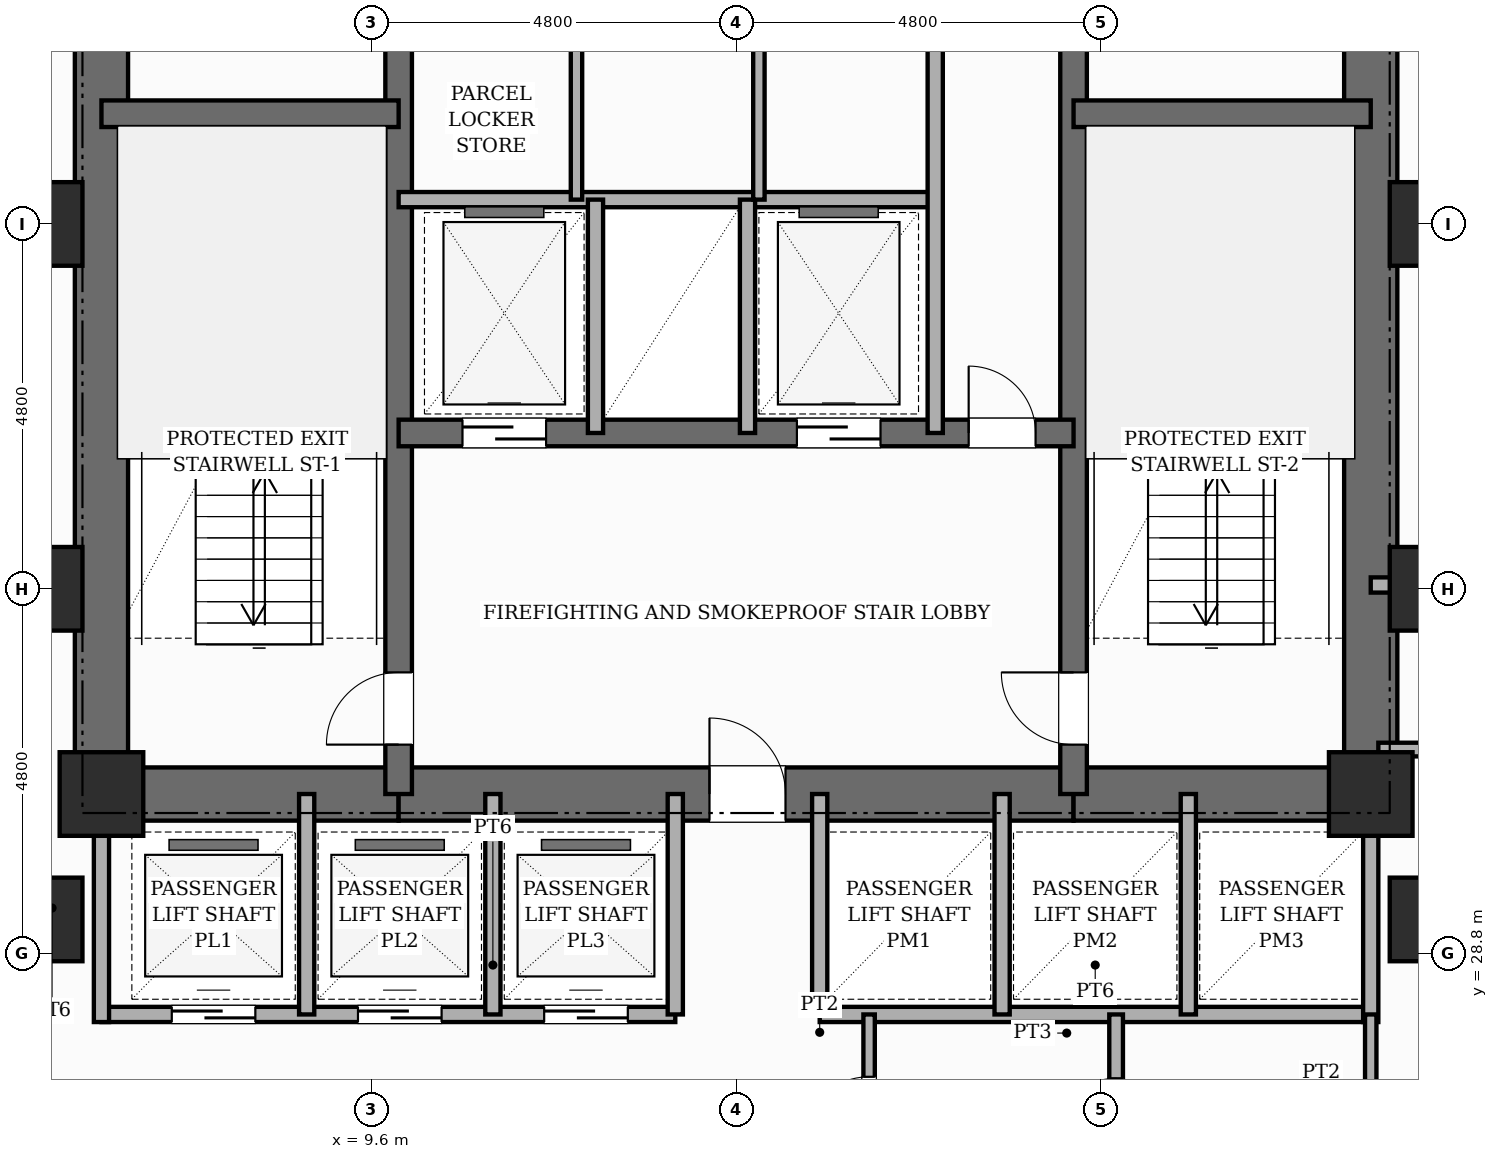
"""IFC4 building model, lengths in metres.
Left out: names, types, materials, properties, quantities, classifications, styles, units other than length and angle.
Written with IfcOpenShell. Run it as: python <this file> out.ifc"""

import sys

from ifc_helpers import new_model, si_unit, direction, frame, frame_2d, origin, origin_2d, place, context, subcontext, project, spatial, rectangle, extrude, element, fill, save


model = new_model("IFC4")
c1 = context("Model", 3, precision=1e-05, world=origin(), true_north=direction((0.0, 1.0)))
c2 = subcontext(c1, "Body", "Model", "MODEL_VIEW")
j1 = project(units=[si_unit("LENGTHUNIT", "METRE"), si_unit("PLANEANGLEUNIT", "RADIAN")], contexts=[c1])
p1 = place(None, origin())
s1 = spatial("IfcSite", under=j1, at=p1, CompositionType="ELEMENT")
p2 = place(p1, origin())
s2 = spatial("IfcBuilding", under=s1, at=p2, CompositionType="ELEMENT")
p3 = place(p2, frame((0.0, 0.0, 79.0)))
s3 = spatial("IfcBuildingStorey", under=s2, at=p3, CompositionType="ELEMENT", Elevation=79.0)
p4 = place(p3, frame((6.05, 30.55, 0.0), z_axis=(0.0, 0.0, 1.0), x_axis=(0.0, 1.0, 0.0)))
e1 = element("IfcWall", 1, at=p4, inside=s3, PredefinedType="SHEAR", context=c2, shape_type="SweptSolid", body=[
    extrude(rectangle(XDim=15.6, YDim=0.7, at=frame_2d((7.8, 0.0))), origin(), (0.0, 0.0, 1.0), 3.6),
])
p5 = place(p3, frame((22.75, 30.55, 0.0), z_axis=(0.0, 0.0, 1.0), x_axis=(0.0, 1.0, 0.0)))
e2 = element("IfcWall", 2, at=p5, inside=s3, PredefinedType="SHEAR", context=c2, shape_type="SweptSolid", body=[
    extrude(rectangle(XDim=15.6, YDim=0.7, at=frame_2d((7.8, 0.0))), origin(), (0.0, 0.0, 1.0), 3.6),
])
p6 = place(p5, frame((10.8, 0.0, 0.0)))
e3 = element("IfcOpeningElement", 3, at=p6, cuts=e2, PredefinedType="OPENING", context=c2, shape_type="SweptSolid", body=[
    extrude(rectangle(XDim=1.0, YDim=2.15, at=frame_2d((0.5, 1.075))), frame((0.0, 0.36, 0.0), z_axis=(0.0, -1.0, 0.0), x_axis=(1.0, 0.0, 0.0)), (0.0, 0.0, 1.0), 0.72),
])
p7 = place(p3, frame((6.05, 30.9, 0.0), z_axis=(0.0, 0.0, 1.0), x_axis=(1.0, 0.0, 0.0)))
e4 = element("IfcWall", 4, at=p7, inside=s3, PredefinedType="SHEAR", context=c2, shape_type="SweptSolid", body=[
    extrude(rectangle(XDim=3.91, YDim=0.7, at=frame_2d((1.955, 0.0))), origin(), (0.0, 0.0, 1.0), 3.6),
])
p8 = place(p3, frame((9.96, 30.9, 0.0), z_axis=(0.0, 0.0, 1.0), x_axis=(1.0, 0.0, 0.0)))
e5 = element("IfcWall", 5, at=p8, inside=s3, PredefinedType="SHEAR", context=c2, shape_type="SweptSolid", body=[
    extrude(rectangle(XDim=8.88, YDim=0.7, at=frame_2d((4.44, 0.0))), origin(), (0.0, 0.0, 1.0), 3.6),
])
p9 = place(p8, frame((4.09, 0.0, 0.0)))
e6 = element("IfcOpeningElement", 6, at=p9, cuts=e5, PredefinedType="OPENING", context=c2, shape_type="SweptSolid", body=[
    extrude(rectangle(XDim=1.0, YDim=2.15, at=frame_2d((0.5, 1.075))), frame((0.0, 0.36, 0.0), z_axis=(0.0, -1.0, 0.0), x_axis=(1.0, 0.0, 0.0)), (0.0, 0.0, 1.0), 0.72),
])
p10 = place(p3, frame((18.84, 30.9, 0.0), z_axis=(0.0, 0.0, 1.0), x_axis=(1.0, 0.0, 0.0)))
e7 = element("IfcWall", 7, at=p10, inside=s3, PredefinedType="SHEAR", context=c2, shape_type="SweptSolid", body=[
    extrude(rectangle(XDim=3.91, YDim=0.7, at=frame_2d((1.955, 0.0))), origin(), (0.0, 0.0, 1.0), 3.6),
])
p11 = place(p3, frame((9.96, 30.9, 0.0), z_axis=(0.0, 0.0, 1.0), x_axis=(0.0, 1.0, 0.0)))
e8 = element("IfcWall", 8, at=p11, inside=s3, PredefinedType="SHEAR", context=c2, shape_type="SweptSolid", body=[
    extrude(rectangle(XDim=14.9, YDim=0.35, at=frame_2d((7.45, 0.0))), origin(), (0.0, 0.0, 1.0), 3.6),
])
p12 = place(p11, frame((0.65, 0.0, 0.0)))
e9 = element("IfcOpeningElement", 9, at=p12, cuts=e8, PredefinedType="OPENING", context=c2, shape_type="SweptSolid", body=[
    extrude(rectangle(XDim=0.95, YDim=2.1, at=frame_2d((0.475, 1.05))), frame((0.0, 0.185, 0.0), z_axis=(0.0, -1.0, 0.0), x_axis=(1.0, 0.0, 0.0)), (0.0, 0.0, 1.0), 0.37),
])
p13 = place(p11, frame((10.45, 0.0, 0.0)))
e10 = element("IfcOpeningElement", 10, at=p13, cuts=e8, PredefinedType="OPENING", context=c2, shape_type="SweptSolid", body=[
    extrude(rectangle(XDim=1.0, YDim=2.15, at=frame_2d((0.5, 1.075))), frame((0.0, 0.185, 0.0), z_axis=(0.0, -1.0, 0.0), x_axis=(1.0, 0.0, 0.0)), (0.0, 0.0, 1.0), 0.37),
])
p14 = place(p3, frame((18.84, 30.9, 0.0), z_axis=(0.0, 0.0, 1.0), x_axis=(0.0, 1.0, 0.0)))
e11 = element("IfcWall", 11, at=p14, inside=s3, PredefinedType="SHEAR", context=c2, shape_type="SweptSolid", body=[
    extrude(rectangle(XDim=14.9, YDim=0.35, at=frame_2d((7.45, 0.0))), origin(), (0.0, 0.0, 1.0), 3.6),
])
p15 = place(p14, frame((0.65, 0.0, 0.0)))
e12 = element("IfcOpeningElement", 12, at=p15, cuts=e11, PredefinedType="OPENING", context=c2, shape_type="SweptSolid", body=[
    extrude(rectangle(XDim=0.95, YDim=2.1, at=frame_2d((0.475, 1.05))), frame((0.0, 0.185, 0.0), z_axis=(0.0, -1.0, 0.0), x_axis=(1.0, 0.0, 0.0)), (0.0, 0.0, 1.0), 0.37),
])
p16 = place(p14, frame((10.45, 0.0, 0.0)))
e13 = element("IfcOpeningElement", 13, at=p16, cuts=e11, PredefinedType="OPENING", context=c2, shape_type="SweptSolid", body=[
    extrude(rectangle(XDim=1.0, YDim=2.15, at=frame_2d((0.5, 1.075))), frame((0.0, 0.185, 0.0), z_axis=(0.0, -1.0, 0.0), x_axis=(1.0, 0.0, 0.0)), (0.0, 0.0, 1.0), 0.37),
])
for number, where, z_axis, x_axis in (
    (14, (6.05, 39.85, 0.0), (0.0, 0.0, 1.0), (1.0, 0.0, 0.0)),
    (15, (18.84, 39.85, 0.0), (0.0, 0.0, 1.0), (1.0, 0.0, 0.0)),
):
    element("IfcWall", number, at=place(p3, frame(where, z_axis=z_axis, x_axis=x_axis)), inside=s3, PredefinedType="SHEAR", context=c2, shape_type="SweptSolid", body=[
        extrude(rectangle(XDim=3.91, YDim=0.35, at=frame_2d((1.955, 0.0))), origin(), (0.0, 0.0, 1.0), 3.6),
    ])
p17 = place(p3, frame((9.96, 35.65, 0.0), z_axis=(0.0, 0.0, 1.0), x_axis=(1.0, 0.0, 0.0)))
e16 = element("IfcWall", 16, at=p17, inside=s3, PredefinedType="SHEAR", context=c2, shape_type="SweptSolid", body=[
    extrude(rectangle(XDim=8.88, YDim=0.35, at=frame_2d((4.44, 0.0))), origin(), (0.0, 0.0, 1.0), 3.6),
])
p18 = place(p17, frame((0.84, 0.0, 0.0)))
e17 = element("IfcOpeningElement", 17, at=p18, cuts=e16, PredefinedType="OPENING", context=c2, shape_type="SweptSolid", body=[
    extrude(rectangle(XDim=1.1, YDim=2.15, at=frame_2d((0.55, 1.075))), frame((0.0, 0.185, 0.0), z_axis=(0.0, -1.0, 0.0), x_axis=(1.0, 0.0, 0.0)), (0.0, 0.0, 1.0), 0.37),
])
p19 = place(p17, frame((5.24, 0.0, 0.0)))
e18 = element("IfcOpeningElement", 18, at=p19, cuts=e16, PredefinedType="OPENING", context=c2, shape_type="SweptSolid", body=[
    extrude(rectangle(XDim=1.1, YDim=2.15, at=frame_2d((0.55, 1.075))), frame((0.0, 0.185, 0.0), z_axis=(0.0, -1.0, 0.0), x_axis=(1.0, 0.0, 0.0)), (0.0, 0.0, 1.0), 0.37),
])
p20 = place(p17, frame((7.5, 0.0, 0.0)))
e19 = element("IfcOpeningElement", 19, at=p20, cuts=e16, PredefinedType="OPENING", context=c2, shape_type="SweptSolid", body=[
    extrude(rectangle(XDim=0.88, YDim=2.1, at=frame_2d((0.44, 1.05))), frame((0.0, 0.185, 0.0), z_axis=(0.0, -1.0, 0.0), x_axis=(1.0, 0.0, 0.0)), (0.0, 0.0, 1.0), 0.37),
])
for number, where, z_axis, x_axis in (
    (20, (5.25, 29.25, 0.0), (0.0, 0.0, 1.0), (1.0, 0.0, 0.0)),
    (21, (5.25, 33.6, 0.0), (0.0, 0.0, 1.0), (1.0, 0.0, 0.0)),
    (22, (5.25, 38.4, 0.0), (0.0, 0.0, 1.0), (1.0, 0.0, 0.0)),
    (23, (6.05, 30.9, 0.0), (0.0, 0.0, 1.0), (1.0, 0.0, 0.0)),
    (24, (22.75, 30.9, 0.0), (0.0, 0.0, 1.0), (1.0, 0.0, 0.0)),
    (25, (23.55, 29.25, 0.0), (0.0, 0.0, 1.0), (1.0, 0.0, 0.0)),
    (26, (23.55, 33.6, 0.0), (0.0, 0.0, 1.0), (1.0, 0.0, 0.0)),
    (27, (23.55, 38.4, 0.0), (0.0, 0.0, 1.0), (1.0, 0.0, 0.0)),
):
    element("IfcColumn", number, at=place(p3, frame(where, z_axis=z_axis, x_axis=x_axis)), inside=s3, PredefinedType="COLUMN", context=c2, shape_type="SweptSolid", body=[
        extrude(rectangle(XDim=1.1, YDim=1.1, at=origin_2d()), origin(), (0.0, 0.0, 1.0), 3.6),
    ])
p21 = place(p3, frame((9.96, 38.72, 0.0), z_axis=(0.0, 0.0, 1.0), x_axis=(1.0, 0.0, 0.0)))
e28 = element("IfcWall", 28, at=p21, inside=s3, PredefinedType="POLYGONAL", context=c2, shape_type="SweptSolid", body=[
    extrude(rectangle(XDim=7.06, YDim=0.2, at=frame_2d((3.53, 0.0))), origin(), (0.0, 0.0, 1.0), 3.35),
])
for number, where, z_axis, x_axis in (
    (29, (12.55, 35.65, 0.0), (0.0, 0.0, 1.0), (0.0, 1.0, 0.0)),
    (30, (14.55, 35.65, 0.0), (0.0, 0.0, 1.0), (0.0, 1.0, 0.0)),
):
    element("IfcWall", number, at=place(p3, frame(where, z_axis=z_axis, x_axis=x_axis)), inside=s3, PredefinedType="POLYGONAL", context=c2, shape_type="SweptSolid", body=[
        extrude(rectangle(XDim=3.07, YDim=0.2, at=frame_2d((1.535, 0.0))), origin(), (0.0, 0.0, 1.0), 3.35),
    ])
p22 = place(p3, frame((17.02, 35.65, 0.0), z_axis=(0.0, 0.0, 1.0), x_axis=(0.0, 1.0, 0.0)))
e31 = element("IfcWall", 31, at=p22, inside=s3, PredefinedType="POLYGONAL", context=c2, shape_type="SweptSolid", body=[
    extrude(rectangle(XDim=5.15, YDim=0.2, at=frame_2d((2.575, 0.0))), origin(), (0.0, 0.0, 1.0), 3.35),
])
for number, where, z_axis, x_axis in (
    (32, (12.3, 38.72, 0.0), (0.0, 0.0, 1.0), (0.0, 1.0, 0.0)),
    (33, (14.7, 38.72, 0.0), (0.0, 0.0, 1.0), (0.0, 1.0, 0.0)),
):
    element("IfcWall", number, at=place(p3, frame(where, z_axis=z_axis, x_axis=x_axis)), inside=s3, PredefinedType="PARTITIONING", context=c2, shape_type="SweptSolid", body=[
        extrude(rectangle(XDim=2.08, YDim=0.15, at=frame_2d((1.04, 0.0))), origin(), (0.0, 0.0, 1.0), 3.35),
    ])
p23 = place(p3, frame((6.05, 28.0, 0.0), z_axis=(0.0, 0.0, 1.0), x_axis=(1.0, 0.0, 0.0)))
e34 = element("IfcWall", 34, at=p23, inside=s3, PredefinedType="POLYGONAL", context=c2, shape_type="SweptSolid", body=[
    extrude(rectangle(XDim=7.55, YDim=0.2, at=frame_2d((3.775, 0.0))), origin(), (0.0, 0.0, 1.0), 3.35),
])
p24 = place(p23, frame((0.925, 0.0, 0.0)))
e35 = element("IfcOpeningElement", 35, at=p24, cuts=e34, PredefinedType="OPENING", context=c2, shape_type="SweptSolid", body=[
    extrude(rectangle(XDim=1.1, YDim=2.15, at=frame_2d((0.55, 1.075))), frame((0.0, 0.11, 0.0), z_axis=(0.0, -1.0, 0.0), x_axis=(1.0, 0.0, 0.0)), (0.0, 0.0, 1.0), 0.22),
])
p25 = place(p23, frame((3.375, 0.0, 0.0)))
e36 = element("IfcOpeningElement", 36, at=p25, cuts=e34, PredefinedType="OPENING", context=c2, shape_type="SweptSolid", body=[
    extrude(rectangle(XDim=1.1, YDim=2.15, at=frame_2d((0.55, 1.075))), frame((0.0, 0.11, 0.0), z_axis=(0.0, -1.0, 0.0), x_axis=(1.0, 0.0, 0.0)), (0.0, 0.0, 1.0), 0.22),
])
p26 = place(p23, frame((5.825, 0.0, 0.0)))
e37 = element("IfcOpeningElement", 37, at=p26, cuts=e34, PredefinedType="OPENING", context=c2, shape_type="SweptSolid", body=[
    extrude(rectangle(XDim=1.1, YDim=2.15, at=frame_2d((0.55, 1.075))), frame((0.0, 0.11, 0.0), z_axis=(0.0, -1.0, 0.0), x_axis=(1.0, 0.0, 0.0)), (0.0, 0.0, 1.0), 0.22),
])
p27 = place(p3, frame((15.5, 28.0, 0.0), z_axis=(0.0, 0.0, 1.0), x_axis=(1.0, 0.0, 0.0)))
e38 = element("IfcWall", 38, at=p27, inside=s3, PredefinedType="POLYGONAL", context=c2, shape_type="SweptSolid", body=[
    extrude(rectangle(XDim=7.25, YDim=0.2, at=frame_2d((3.625, 0.0))), origin(), (0.0, 0.0, 1.0), 3.35),
])
for number, where, z_axis, x_axis in (
    (39, (6.05, 27.9, 0.0), (0.0, 0.0, 1.0), (0.0, 1.0, 0.0)),
    (40, (22.75, 27.9, 0.0), (0.0, 0.0, 1.0), (0.0, 1.0, 0.0)),
):
    element("IfcWall", number, at=place(p3, frame(where, z_axis=z_axis, x_axis=x_axis)), inside=s3, PredefinedType="POLYGONAL", context=c2, shape_type="SweptSolid", body=[
        extrude(rectangle(XDim=3.0, YDim=0.2, at=frame_2d((1.5, 0.0))), origin(), (0.0, 0.0, 1.0), 3.35),
    ])
for number, where, z_axis, x_axis in (
    (41, (13.6, 28.0, 0.0), (0.0, 0.0, 1.0), (0.0, 1.0, 0.0)),
    (42, (15.5, 28.0, 0.0), (0.0, 0.0, 1.0), (0.0, 1.0, 0.0)),
    (43, (8.75, 28.0, 0.0), (0.0, 0.0, 1.0), (0.0, 1.0, 0.0)),
    (44, (11.2, 28.0, 0.0), (0.0, 0.0, 1.0), (0.0, 1.0, 0.0)),
    (45, (17.9, 28.0, 0.0), (0.0, 0.0, 1.0), (0.0, 1.0, 0.0)),
    (46, (20.35, 28.0, 0.0), (0.0, 0.0, 1.0), (0.0, 1.0, 0.0)),
):
    element("IfcWall", number, at=place(p3, frame(where, z_axis=z_axis, x_axis=x_axis)), inside=s3, PredefinedType="POLYGONAL", context=c2, shape_type="SweptSolid", body=[
        extrude(rectangle(XDim=2.9, YDim=0.2, at=frame_2d((1.45, 0.0))), origin(), (0.0, 0.0, 1.0), 3.35),
    ])
p28 = place(p3, frame((16.15, 25.75, 0.0), z_axis=(0.0, 0.0, 1.0), x_axis=(0.0, 1.0, 0.0)))
e47 = element("IfcWall", 47, at=p28, inside=s3, PredefinedType="PARTITIONING", context=c2, shape_type="SweptSolid", body=[
    extrude(rectangle(XDim=2.25, YDim=0.15, at=frame_2d((1.125, 0.0))), origin(), (0.0, 0.0, 1.0), 3.35),
])
p29 = place(p28, frame((0.55, 0.0, 0.0)))
e48 = element("IfcOpeningElement", 48, at=p29, cuts=e47, PredefinedType="OPENING", context=c2, shape_type="SweptSolid", body=[
    extrude(rectangle(XDim=0.88, YDim=2.1, at=frame_2d((0.44, 1.05))), frame((0.0, 0.085, 0.0), z_axis=(0.0, -1.0, 0.0), x_axis=(1.0, 0.0, 0.0)), (0.0, 0.0, 1.0), 0.17),
])
p30 = place(p3, frame((22.75, 25.75, 0.0), z_axis=(0.0, 0.0, 1.0), x_axis=(0.0, 1.0, 0.0)))
e49 = element("IfcWall", 49, at=p30, inside=s3, PredefinedType="PARTITIONING", context=c2, shape_type="SweptSolid", body=[
    extrude(rectangle(XDim=2.25, YDim=0.15, at=frame_2d((1.125, 0.0))), origin(), (0.0, 0.0, 1.0), 3.35),
])
p31 = place(p3, frame((19.4, 25.75, 0.0), z_axis=(0.0, 0.0, 1.0), x_axis=(0.0, 1.0, 0.0)))
e50 = element("IfcWall", 50, at=p31, inside=s3, PredefinedType="PLUMBINGWALL", context=c2, shape_type="SweptSolid", body=[
    extrude(rectangle(XDim=2.25, YDim=0.18, at=frame_2d((1.125, 0.0))), origin(), (0.0, 0.0, 1.0), 3.35),
])
p32 = place(p31, frame((0.55, 0.0, 0.0)))
e51 = element("IfcOpeningElement", 51, at=p32, cuts=e50, PredefinedType="OPENING", context=c2, shape_type="SweptSolid", body=[
    extrude(rectangle(XDim=0.86, YDim=2.1, at=frame_2d((0.43, 1.05))), frame((0.0, 0.1, 0.0), z_axis=(0.0, -1.0, 0.0), x_axis=(1.0, 0.0, 0.0)), (0.0, 0.0, 1.0), 0.2),
])
p33 = place(p3, frame((22.75, 33.65, 0.0), z_axis=(0.0, 0.0, 1.0), x_axis=(1.0, 0.0, 0.0)))
e52 = element("IfcWall", 52, at=p33, inside=s3, PredefinedType="PARTITIONING", context=c2, shape_type="SweptSolid", body=[
    extrude(rectangle(XDim=34.53, YDim=0.2, at=frame_2d((17.265, 0.0))), origin(), (0.0, 0.0, 1.0), 2.53),
])
p34 = place(p33, frame((5.495, 0.0, 0.0)))
e53 = element("IfcOpeningElement", 53, at=p34, cuts=e52, PredefinedType="OPENING", context=c2, shape_type="SweptSolid", body=[
    extrude(rectangle(XDim=0.98, YDim=2.18, at=frame_2d((0.49, 1.09))), frame((0.0, 0.11, 0.0), z_axis=(0.0, -1.0, 0.0), x_axis=(1.0, 0.0, 0.0)), (0.0, 0.0, 1.0), 0.22),
])
p35 = place(p33, frame((9.961, 0.0, 0.0)))
e54 = element("IfcOpeningElement", 54, at=p35, cuts=e52, PredefinedType="OPENING", context=c2, shape_type="SweptSolid", body=[
    extrude(rectangle(XDim=0.98, YDim=2.18, at=frame_2d((0.49, 1.09))), frame((0.0, 0.11, 0.0), z_axis=(0.0, -1.0, 0.0), x_axis=(1.0, 0.0, 0.0)), (0.0, 0.0, 1.0), 0.22),
])
p36 = place(p33, frame((19.066, 0.0, 0.0)))
e55 = element("IfcOpeningElement", 55, at=p36, cuts=e52, PredefinedType="OPENING", context=c2, shape_type="SweptSolid", body=[
    extrude(rectangle(XDim=0.98, YDim=2.18, at=frame_2d((0.49, 1.09))), frame((0.0, 0.11, 0.0), z_axis=(0.0, -1.0, 0.0), x_axis=(1.0, 0.0, 0.0)), (0.0, 0.0, 1.0), 0.22),
])
p37 = place(p33, frame((27.815, 0.0, 0.0)))
e56 = element("IfcOpeningElement", 56, at=p37, cuts=e52, PredefinedType="OPENING", context=c2, shape_type="SweptSolid", body=[
    extrude(rectangle(XDim=0.98, YDim=2.18, at=frame_2d((0.49, 1.09))), frame((0.0, 0.11, 0.0), z_axis=(0.0, -1.0, 0.0), x_axis=(1.0, 0.0, 0.0)), (0.0, 0.0, 1.0), 0.22),
])
p38 = place(p3, frame((22.85, 31.485, 0.0), z_axis=(0.0, 0.0, 1.0), x_axis=(1.0, 0.0, 0.0)))
e57 = element("IfcWall", 57, at=p38, inside=s3, PredefinedType="PLUMBINGWALL", context=c2, shape_type="SweptSolid", body=[
    extrude(rectangle(XDim=3.9, YDim=0.18, at=frame_2d((1.95, 0.0))), origin(), (0.0, 0.0, 1.0), 3.35),
])
p39 = place(p12, origin())
e58 = element("IfcDoor", 58, at=p39, inside=s3, OperationType="SINGLE_SWING_LEFT", PredefinedType="DOOR", context=c2, shape_type="SweptSolid", body=[
    extrude(rectangle(XDim=0.95, YDim=2.1, at=frame_2d((0.475, 1.05))), frame((0.0, 0.025, 0.0), z_axis=(0.0, -1.0, 0.0), x_axis=(1.0, 0.0, 0.0)), (0.0, 0.0, 1.0), 0.05),
])
fill(e9, e58)
p40 = place(p15, origin())
e59 = element("IfcDoor", 59, at=p40, inside=s3, OperationType="SINGLE_SWING_RIGHT", PredefinedType="DOOR", context=c2, shape_type="SweptSolid", body=[
    extrude(rectangle(XDim=0.95, YDim=2.1, at=frame_2d((0.475, 1.05))), frame((0.0, 0.025, 0.0), z_axis=(0.0, -1.0, 0.0), x_axis=(1.0, 0.0, 0.0)), (0.0, 0.0, 1.0), 0.05),
])
fill(e12, e59)
p41 = place(p9, origin())
e60 = element("IfcDoor", 60, at=p41, inside=s3, OperationType="SINGLE_SWING_LEFT", PredefinedType="DOOR", context=c2, shape_type="SweptSolid", body=[
    extrude(rectangle(XDim=1.0, YDim=2.15, at=frame_2d((0.5, 1.075))), frame((0.0, 0.025, 0.0), z_axis=(0.0, -1.0, 0.0), x_axis=(1.0, 0.0, 0.0)), (0.0, 0.0, 1.0), 0.05),
])
fill(e6, e60)
p42 = place(p18, origin())
e61 = element("IfcDoor", 61, at=p42, inside=s3, OperationType="SLIDING_TO_LEFT", PredefinedType="DOOR", context=c2, shape_type="SweptSolid", body=[
    extrude(rectangle(XDim=1.1, YDim=2.15, at=frame_2d((0.55, 1.075))), frame((0.0, 0.025, 0.0), z_axis=(0.0, -1.0, 0.0), x_axis=(1.0, 0.0, 0.0)), (0.0, 0.0, 1.0), 0.05),
])
fill(e17, e61)
p43 = place(p19, origin())
e62 = element("IfcDoor", 62, at=p43, inside=s3, OperationType="SLIDING_TO_RIGHT", PredefinedType="DOOR", context=c2, shape_type="SweptSolid", body=[
    extrude(rectangle(XDim=1.1, YDim=2.15, at=frame_2d((0.55, 1.075))), frame((0.0, 0.025, 0.0), z_axis=(0.0, -1.0, 0.0), x_axis=(1.0, 0.0, 0.0)), (0.0, 0.0, 1.0), 0.05),
])
fill(e18, e62)
p44 = place(p20, origin())
e63 = element("IfcDoor", 63, at=p44, inside=s3, OperationType="SINGLE_SWING_LEFT", PredefinedType="DOOR", context=c2, shape_type="SweptSolid", body=[
    extrude(rectangle(XDim=0.88, YDim=2.1, at=frame_2d((0.44, 1.05))), frame((0.0, 0.025, 0.0), z_axis=(0.0, -1.0, 0.0), x_axis=(1.0, 0.0, 0.0)), (0.0, 0.0, 1.0), 0.05),
])
fill(e19, e63)
p45 = place(p24, origin())
e64 = element("IfcDoor", 64, at=p45, inside=s3, OperationType="SLIDING_TO_LEFT", PredefinedType="DOOR", context=c2, shape_type="SweptSolid", body=[
    extrude(rectangle(XDim=1.1, YDim=2.15, at=frame_2d((0.55, 1.075))), frame((0.0, 0.025, 0.0), z_axis=(0.0, -1.0, 0.0), x_axis=(1.0, 0.0, 0.0)), (0.0, 0.0, 1.0), 0.05),
])
fill(e35, e64)
p46 = place(p25, origin())
e65 = element("IfcDoor", 65, at=p46, inside=s3, OperationType="SLIDING_TO_RIGHT", PredefinedType="DOOR", context=c2, shape_type="SweptSolid", body=[
    extrude(rectangle(XDim=1.1, YDim=2.15, at=frame_2d((0.55, 1.075))), frame((0.0, 0.025, 0.0), z_axis=(0.0, -1.0, 0.0), x_axis=(1.0, 0.0, 0.0)), (0.0, 0.0, 1.0), 0.05),
])
fill(e36, e65)
p47 = place(p26, origin())
e66 = element("IfcDoor", 66, at=p47, inside=s3, OperationType="SLIDING_TO_LEFT", PredefinedType="DOOR", context=c2, shape_type="SweptSolid", body=[
    extrude(rectangle(XDim=1.1, YDim=2.15, at=frame_2d((0.55, 1.075))), frame((0.0, 0.025, 0.0), z_axis=(0.0, -1.0, 0.0), x_axis=(1.0, 0.0, 0.0)), (0.0, 0.0, 1.0), 0.05),
])
fill(e37, e66)
p48 = place(p29, origin())
e67 = element("IfcDoor", 67, at=p48, inside=s3, OperationType="SINGLE_SWING_LEFT", PredefinedType="DOOR", context=c2, shape_type="SweptSolid", body=[
    extrude(rectangle(XDim=0.88, YDim=2.1, at=frame_2d((0.44, 1.05))), frame((0.0, 0.025, 0.0), z_axis=(0.0, -1.0, 0.0), x_axis=(1.0, 0.0, 0.0)), (0.0, 0.0, 1.0), 0.05),
])
fill(e48, e67)
p49 = place(p32, origin())
e68 = element("IfcDoor", 68, at=p49, inside=s3, OperationType="SINGLE_SWING_LEFT", PredefinedType="DOOR", context=c2, shape_type="SweptSolid", body=[
    extrude(rectangle(XDim=0.86, YDim=2.1, at=frame_2d((0.43, 1.05))), frame((0.0, 0.025, 0.0), z_axis=(0.0, -1.0, 0.0), x_axis=(1.0, 0.0, 0.0)), (0.0, 0.0, 1.0), 0.05),
])
fill(e51, e68)
save(model, sys.argv[1])
